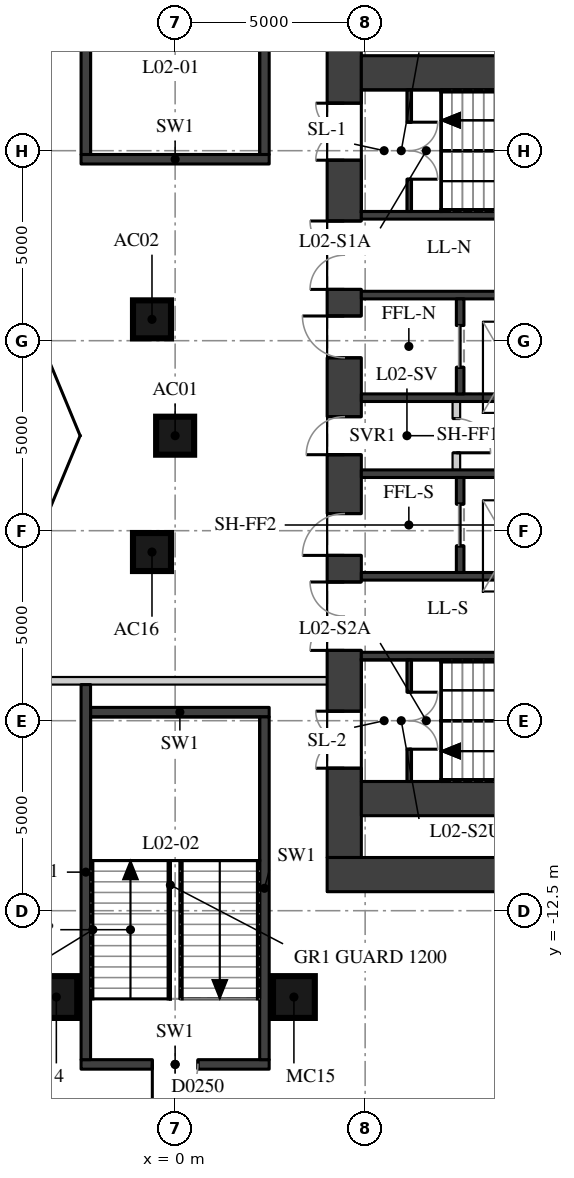
"""IFC4 building model, lengths in metres.
Left out: names, types, materials, properties, quantities, classifications, styles, units other than length and angle.
Written with IfcOpenShell. Run it as: python <this file> out.ifc"""

import sys

from ifc_helpers import new_model, si_unit, direction, frame, frame_2d, origin, origin_2d, place, context, subcontext, project, spatial, rectangle, extrude, element, fill, save


model = new_model("IFC4")
c1 = context("Model", 3, precision=1e-05, world=origin(), true_north=direction((0.0, 1.0)))
c2 = subcontext(c1, "Body", "Model", "MODEL_VIEW")
j1 = project(units=[si_unit("LENGTHUNIT", "METRE"), si_unit("PLANEANGLEUNIT", "RADIAN")], contexts=[c1])
p1 = place(None, origin())
s1 = spatial("IfcSite", under=j1, at=p1, CompositionType="ELEMENT")
p2 = place(p1, origin())
s2 = spatial("IfcBuilding", under=s1, at=p2, CompositionType="ELEMENT")
p3 = place(p2, frame((0.0, 0.0, 12.5)))
s3 = spatial("IfcBuildingStorey", under=s2, at=p3, CompositionType="ELEMENT", Elevation=12.5)
for number, where, z_axis, x_axis in (
    (1, (0.0, 0.0, 0.0), (0.0, 0.0, 1.0), (1.0, 0.0, 0.0)),
    (2, (-0.609, 3.062, 0.0), (0.0, 0.0, 1.0), (1.0, 0.0, 0.0)),
    (3, (-0.609, -3.062, 0.0), (0.0, 0.0, 1.0), (1.0, 0.0, 0.0)),
):
    element("IfcColumn", number, at=place(p3, frame(where, z_axis=z_axis, x_axis=x_axis)), inside=s3, PredefinedType="COLUMN", context=c2, shape_type="SweptSolid", body=[
        extrude(rectangle(XDim=1.0, YDim=1.0, at=origin_2d()), origin(), (0.0, 0.0, 1.0), 5.0),
    ])
for number, where, z_axis, x_axis in (
    (4, (-3.126, -14.772, 0.0), (0.0, 0.0, 1.0), (1.0, 0.0, 0.0)),
    (5, (3.126, -14.772, 0.0), (0.0, 0.0, 1.0), (1.0, 0.0, 0.0)),
):
    element("IfcColumn", number, at=place(p3, frame(where, z_axis=z_axis, x_axis=x_axis)), inside=s3, PredefinedType="COLUMN", context=c2, shape_type="SweptSolid", body=[
        extrude(rectangle(XDim=1.1, YDim=1.1, at=origin_2d()), origin(), (0.0, 0.0, 1.0), 5.0),
    ])
p4 = place(p3, frame((4.45, -11.1, 0.0), z_axis=(0.0, 0.0, 1.0), x_axis=(0.0, 1.0, 0.0)))
e6 = element("IfcWall", 6, at=p4, inside=s3, PredefinedType="SHEAR", context=c2, shape_type="SweptSolid", body=[
    extrude(rectangle(XDim=22.2, YDim=0.9, at=frame_2d((11.1, 0.0))), origin(), (0.0, 0.0, 1.0), 4.65),
])
p5 = place(p4, frame((2.35, 0.0, 0.0)))
e7 = element("IfcOpeningElement", 7, at=p5, cuts=e6, PredefinedType="OPENING", context=c2, shape_type="SweptSolid", body=[
    extrude(rectangle(XDim=1.5, YDim=2.1, at=frame_2d((0.75, 1.05))), frame((0.0, 0.46, 0.0), z_axis=(0.0, -1.0, 0.0), x_axis=(1.0, 0.0, 0.0)), (0.0, 0.0, 1.0), 0.92),
])
p6 = place(p4, frame((5.45, 0.0, 0.0)))
e8 = element("IfcOpeningElement", 8, at=p6, cuts=e6, PredefinedType="OPENING", context=c2, shape_type="SweptSolid", body=[
    extrude(rectangle(XDim=1.8, YDim=2.1, at=frame_2d((0.9, 1.05))), frame((0.0, 0.46, 0.0), z_axis=(0.0, -1.0, 0.0), x_axis=(1.0, 0.0, 0.0)), (0.0, 0.0, 1.0), 0.92),
])
p7 = place(p4, frame((7.95, 0.0, 0.0)))
e9 = element("IfcOpeningElement", 9, at=p7, cuts=e6, PredefinedType="OPENING", context=c2, shape_type="SweptSolid", body=[
    extrude(rectangle(XDim=1.1, YDim=2.1, at=frame_2d((0.55, 1.05))), frame((0.0, 0.46, 0.0), z_axis=(0.0, -1.0, 0.0), x_axis=(1.0, 0.0, 0.0)), (0.0, 0.0, 1.0), 0.92),
])
p8 = place(p4, frame((10.6, 0.0, 0.0)))
e10 = element("IfcOpeningElement", 10, at=p8, cuts=e6, PredefinedType="OPENING", context=c2, shape_type="SweptSolid", body=[
    extrude(rectangle(XDim=1.0, YDim=2.1, at=frame_2d((0.5, 1.05))), frame((0.0, 0.46, 0.0), z_axis=(0.0, -1.0, 0.0), x_axis=(1.0, 0.0, 0.0)), (0.0, 0.0, 1.0), 0.92),
])
p9 = place(p4, frame((13.15, 0.0, 0.0)))
e11 = element("IfcOpeningElement", 11, at=p9, cuts=e6, PredefinedType="OPENING", context=c2, shape_type="SweptSolid", body=[
    extrude(rectangle(XDim=1.1, YDim=2.1, at=frame_2d((0.55, 1.05))), frame((0.0, 0.46, 0.0), z_axis=(0.0, -1.0, 0.0), x_axis=(1.0, 0.0, 0.0)), (0.0, 0.0, 1.0), 0.92),
])
p10 = place(p4, frame((14.95, 0.0, 0.0)))
e12 = element("IfcOpeningElement", 12, at=p10, cuts=e6, PredefinedType="OPENING", context=c2, shape_type="SweptSolid", body=[
    extrude(rectangle(XDim=1.8, YDim=2.1, at=frame_2d((0.9, 1.05))), frame((0.0, 0.46, 0.0), z_axis=(0.0, -1.0, 0.0), x_axis=(1.0, 0.0, 0.0)), (0.0, 0.0, 1.0), 0.92),
])
p11 = place(p4, frame((18.35, 0.0, 0.0)))
e13 = element("IfcOpeningElement", 13, at=p11, cuts=e6, PredefinedType="OPENING", context=c2, shape_type="SweptSolid", body=[
    extrude(rectangle(XDim=1.5, YDim=2.1, at=frame_2d((0.75, 1.05))), frame((0.0, 0.46, 0.0), z_axis=(0.0, -1.0, 0.0), x_axis=(1.0, 0.0, 0.0)), (0.0, 0.0, 1.0), 0.92),
])
p12 = place(p3, frame((4.0, -11.55, 0.0), z_axis=(0.0, 0.0, 1.0), x_axis=(1.0, 0.0, 0.0)))
e14 = element("IfcWall", 14, at=p12, inside=s3, PredefinedType="SHEAR", context=c2, shape_type="SweptSolid", body=[
    extrude(rectangle(XDim=15.2, YDim=0.9, at=frame_2d((7.6, 0.0))), origin(), (0.0, 0.0, 1.0), 4.65),
])
for number, where, z_axis, x_axis in (
    (15, (4.9, 9.55, 0.0), (0.0, 0.0, 1.0), (1.0, 0.0, 0.0)),
    (16, (4.9, -9.55, 0.0), (0.0, 0.0, 1.0), (1.0, 0.0, 0.0)),
):
    element("IfcWall", number, at=place(p3, frame(where, z_axis=z_axis, x_axis=x_axis)), inside=s3, PredefinedType="SHEAR", context=c2, shape_type="SweptSolid", body=[
        extrude(rectangle(XDim=10.2, YDim=0.9, at=frame_2d((5.1, 0.0))), origin(), (0.0, 0.0, 1.0), 4.65),
    ])
p13 = place(p3, frame((4.9, 5.8, 0.0), z_axis=(0.0, 0.0, 1.0), x_axis=(1.0, 0.0, 0.0)))
e17 = element("IfcWall", 17, at=p13, inside=s3, PredefinedType="SHEAR", context=c2, shape_type="SweptSolid", body=[
    extrude(rectangle(XDim=10.2, YDim=0.2, at=frame_2d((5.1, 0.0))), origin(), (0.0, 0.0, 1.0), 4.65),
])
p14 = place(p13, frame((6.75, 0.0, 0.0)))
e18 = element("IfcOpeningElement", 18, at=p14, cuts=e17, PredefinedType="OPENING", context=c2, shape_type="SweptSolid", body=[
    extrude(rectangle(XDim=1.1, YDim=2.1, at=frame_2d((0.55, 1.05))), frame((0.0, 0.11, 0.0), z_axis=(0.0, -1.0, 0.0), x_axis=(1.0, 0.0, 0.0)), (0.0, 0.0, 1.0), 0.22),
])
p15 = place(p13, frame((8.75, 0.0, 0.0)))
e19 = element("IfcOpeningElement", 19, at=p15, cuts=e17, PredefinedType="OPENING", context=c2, shape_type="SweptSolid", body=[
    extrude(rectangle(XDim=1.1, YDim=2.1, at=frame_2d((0.55, 1.05))), frame((0.0, 0.11, 0.0), z_axis=(0.0, -1.0, 0.0), x_axis=(1.0, 0.0, 0.0)), (0.0, 0.0, 1.0), 0.22),
])
p16 = place(p3, frame((4.9, 3.7, 0.0), z_axis=(0.0, 0.0, 1.0), x_axis=(1.0, 0.0, 0.0)))
e20 = element("IfcWall", 20, at=p16, inside=s3, PredefinedType="SHEAR", context=c2, shape_type="SweptSolid", body=[
    extrude(rectangle(XDim=10.2, YDim=0.2, at=frame_2d((5.1, 0.0))), origin(), (0.0, 0.0, 1.0), 4.65),
])
p17 = place(p16, frame((6.3, 0.0, 0.0)))
e21 = element("IfcOpeningElement", 21, at=p17, cuts=e20, PredefinedType="OPENING", context=c2, shape_type="SweptSolid", body=[
    extrude(rectangle(XDim=1.1, YDim=2.1, at=frame_2d((0.55, 1.05))), frame((0.0, 0.11, 0.0), z_axis=(0.0, -1.0, 0.0), x_axis=(1.0, 0.0, 0.0)), (0.0, 0.0, 1.0), 0.22),
])
p18 = place(p16, frame((8.6, 0.0, 0.0)))
e22 = element("IfcOpeningElement", 22, at=p18, cuts=e20, PredefinedType="OPENING", context=c2, shape_type="SweptSolid", body=[
    extrude(rectangle(XDim=1.1, YDim=2.1, at=frame_2d((0.55, 1.05))), frame((0.0, 0.11, 0.0), z_axis=(0.0, -1.0, 0.0), x_axis=(1.0, 0.0, 0.0)), (0.0, 0.0, 1.0), 0.22),
])
for number, where, z_axis, x_axis in (
    (23, (4.9, 1.0, 0.0), (0.0, 0.0, 1.0), (1.0, 0.0, 0.0)),
    (24, (4.9, -1.0, 0.0), (0.0, 0.0, 1.0), (1.0, 0.0, 0.0)),
):
    element("IfcWall", number, at=place(p3, frame(where, z_axis=z_axis, x_axis=x_axis)), inside=s3, PredefinedType="SHEAR", context=c2, shape_type="SweptSolid", body=[
        extrude(rectangle(XDim=10.2, YDim=0.2, at=frame_2d((5.1, 0.0))), origin(), (0.0, 0.0, 1.0), 4.65),
    ])
p19 = place(p3, frame((4.9, -3.7, 0.0), z_axis=(0.0, 0.0, 1.0), x_axis=(1.0, 0.0, 0.0)))
e25 = element("IfcWall", 25, at=p19, inside=s3, PredefinedType="SHEAR", context=c2, shape_type="SweptSolid", body=[
    extrude(rectangle(XDim=10.2, YDim=0.2, at=frame_2d((5.1, 0.0))), origin(), (0.0, 0.0, 1.0), 4.65),
])
p20 = place(p19, frame((6.3, 0.0, 0.0)))
e26 = element("IfcOpeningElement", 26, at=p20, cuts=e25, PredefinedType="OPENING", context=c2, shape_type="SweptSolid", body=[
    extrude(rectangle(XDim=1.1, YDim=2.1, at=frame_2d((0.55, 1.05))), frame((0.0, 0.11, 0.0), z_axis=(0.0, -1.0, 0.0), x_axis=(1.0, 0.0, 0.0)), (0.0, 0.0, 1.0), 0.22),
])
p21 = place(p19, frame((8.6, 0.0, 0.0)))
e27 = element("IfcOpeningElement", 27, at=p21, cuts=e25, PredefinedType="OPENING", context=c2, shape_type="SweptSolid", body=[
    extrude(rectangle(XDim=1.1, YDim=2.1, at=frame_2d((0.55, 1.05))), frame((0.0, 0.11, 0.0), z_axis=(0.0, -1.0, 0.0), x_axis=(1.0, 0.0, 0.0)), (0.0, 0.0, 1.0), 0.22),
])
p22 = place(p3, frame((4.9, -5.8, 0.0), z_axis=(0.0, 0.0, 1.0), x_axis=(1.0, 0.0, 0.0)))
e28 = element("IfcWall", 28, at=p22, inside=s3, PredefinedType="SHEAR", context=c2, shape_type="SweptSolid", body=[
    extrude(rectangle(XDim=10.2, YDim=0.2, at=frame_2d((5.1, 0.0))), origin(), (0.0, 0.0, 1.0), 4.65),
])
p23 = place(p3, frame((7.5, 1.1, 0.0), z_axis=(0.0, 0.0, 1.0), x_axis=(0.0, 1.0, 0.0)))
e29 = element("IfcWall", 29, at=p23, inside=s3, PredefinedType="SHEAR", context=c2, shape_type="SweptSolid", body=[
    extrude(rectangle(XDim=2.5, YDim=0.2, at=frame_2d((1.25, 0.0))), origin(), (0.0, 0.0, 1.0), 4.65),
])
p24 = place(p23, frame((0.7, 0.0, 0.0)))
e30 = element("IfcOpeningElement", 30, at=p24, cuts=e29, PredefinedType="OPENING", context=c2, shape_type="SweptSolid", body=[
    extrude(rectangle(XDim=1.1, YDim=2.1, at=frame_2d((0.55, 1.05))), frame((0.0, 0.11, 0.0), z_axis=(0.0, -1.0, 0.0), x_axis=(1.0, 0.0, 0.0)), (0.0, 0.0, 1.0), 0.22),
])
p25 = place(p3, frame((7.5, -3.6, 0.0), z_axis=(0.0, 0.0, 1.0), x_axis=(0.0, 1.0, 0.0)))
e31 = element("IfcWall", 31, at=p25, inside=s3, PredefinedType="SHEAR", context=c2, shape_type="SweptSolid", body=[
    extrude(rectangle(XDim=2.5, YDim=0.2, at=frame_2d((1.25, 0.0))), origin(), (0.0, 0.0, 1.0), 4.65),
])
p26 = place(p25, frame((0.7, 0.0, 0.0)))
e32 = element("IfcOpeningElement", 32, at=p26, cuts=e31, PredefinedType="OPENING", context=c2, shape_type="SweptSolid", body=[
    extrude(rectangle(XDim=1.1, YDim=2.1, at=frame_2d((0.55, 1.05))), frame((0.0, 0.11, 0.0), z_axis=(0.0, -1.0, 0.0), x_axis=(1.0, 0.0, 0.0)), (0.0, 0.0, 1.0), 0.22),
])
p27 = place(p3, frame((6.16, 5.9, 0.0), z_axis=(0.0, 0.0, 1.0), x_axis=(0.0, 1.0, 0.0)))
e33 = element("IfcWall", 33, at=p27, inside=s3, PredefinedType="SHEAR", context=c2, shape_type="SweptSolid", body=[
    extrude(rectangle(XDim=3.2, YDim=0.12, at=frame_2d((1.6, 0.0))), origin(), (0.0, 0.0, 1.0), 2.29),
])
p28 = place(p27, frame((0.85, 0.0, 0.0)))
e34 = element("IfcOpeningElement", 34, at=p28, cuts=e33, PredefinedType="OPENING", context=c2, shape_type="SweptSolid", body=[
    extrude(rectangle(XDim=1.5, YDim=2.1, at=frame_2d((0.75, 1.05))), frame((0.0, 0.07, 0.0), z_axis=(0.0, -1.0, 0.0), x_axis=(1.0, 0.0, 0.0)), (0.0, 0.0, 1.0), 0.14),
])
p29 = place(p3, frame((6.16, -9.1, 0.0), z_axis=(0.0, 0.0, 1.0), x_axis=(0.0, 1.0, 0.0)))
e35 = element("IfcWall", 35, at=p29, inside=s3, PredefinedType="SHEAR", context=c2, shape_type="SweptSolid", body=[
    extrude(rectangle(XDim=3.2, YDim=0.12, at=frame_2d((1.6, 0.0))), origin(), (0.0, 0.0, 1.0), 2.29),
])
p30 = place(p29, frame((0.85, 0.0, 0.0)))
e36 = element("IfcOpeningElement", 36, at=p30, cuts=e35, PredefinedType="OPENING", context=c2, shape_type="SweptSolid", body=[
    extrude(rectangle(XDim=1.5, YDim=2.1, at=frame_2d((0.75, 1.05))), frame((0.0, 0.07, 0.0), z_axis=(0.0, -1.0, 0.0), x_axis=(1.0, 0.0, 0.0)), (0.0, 0.0, 1.0), 0.14),
])
p31 = place(p3, frame((7.4, -0.9, 0.0), z_axis=(0.0, 0.0, 1.0), x_axis=(0.0, 1.0, 0.0)))
e37 = element("IfcWall", 37, at=p31, inside=s3, PredefinedType="PARTITIONING", context=c2, shape_type="SweptSolid", body=[
    extrude(rectangle(XDim=1.8, YDim=0.2, at=frame_2d((0.9, 0.0))), origin(), (0.0, 0.0, 1.0), 4.65),
])
p32 = place(p31, frame((0.45, 0.0, 0.0)))
e38 = element("IfcOpeningElement", 38, at=p32, cuts=e37, PredefinedType="OPENING", context=c2, shape_type="SweptSolid", body=[
    extrude(rectangle(XDim=0.9, YDim=2.1, at=frame_2d((0.45, 1.05))), frame((0.0, 0.11, 0.0), z_axis=(0.0, -1.0, 0.0), x_axis=(1.0, 0.0, 0.0)), (0.0, 0.0, 1.0), 0.22),
])
p33 = place(p3, frame((-2.475, -16.545, 0.0), z_axis=(0.0, 0.0, 1.0), x_axis=(1.0, 0.0, 0.0)))
e39 = element("IfcWall", 39, at=p33, inside=s3, PredefinedType="SOLIDWALL", context=c2, shape_type="SweptSolid", body=[
    extrude(rectangle(XDim=4.95, YDim=0.25, at=frame_2d((2.475, 0.0))), origin(), (0.0, 0.0, 1.0), 4.65),
])
p34 = place(p33, frame((1.875, 0.0, 0.0)))
e40 = element("IfcOpeningElement", 40, at=p34, cuts=e39, PredefinedType="OPENING", context=c2, shape_type="SweptSolid", body=[
    extrude(rectangle(XDim=1.2, YDim=2.1, at=frame_2d((0.6, 1.05))), frame((0.0, 0.135, 0.0), z_axis=(0.0, -1.0, 0.0), x_axis=(1.0, 0.0, 0.0)), (0.0, 0.0, 1.0), 0.27),
])
p35 = place(p3, frame((-2.225, -7.275, 0.0), z_axis=(0.0, 0.0, 1.0), x_axis=(1.0, 0.0, 0.0)))
e41 = element("IfcWall", 41, at=p35, inside=s3, PredefinedType="SOLIDWALL", context=c2, shape_type="SweptSolid", body=[
    extrude(rectangle(XDim=4.7, YDim=0.25, at=frame_2d((2.35, 0.0))), origin(), (0.0, 0.0, 1.0), 4.65),
])
p36 = place(p3, frame((-14.4, -6.45, 0.0), z_axis=(0.0, 0.0, 1.0), x_axis=(1.0, 0.0, 0.0)))
e42 = element("IfcWall", 42, at=p36, inside=s3, PredefinedType="PARTITIONING", context=c2, shape_type="SweptSolid", body=[
    extrude(rectangle(XDim=18.402, YDim=0.2, at=frame_2d((9.201, 0.0))), origin(), (0.0, 0.0, 1.0), 4.65),
])
p37 = place(p36, frame((8.001, 0.0, 0.0)))
e43 = element("IfcOpeningElement", 43, at=p37, cuts=e42, PredefinedType="OPENING", context=c2, shape_type="SweptSolid", body=[
    extrude(rectangle(XDim=2.4, YDim=2.4, at=frame_2d((1.2, 1.2))), frame((0.0, 0.11, 0.0), z_axis=(0.0, -1.0, 0.0), x_axis=(1.0, 0.0, 0.0)), (0.0, 0.0, 1.0), 0.22),
])
p38 = place(p3, frame((-2.475, 7.275, 0.0), z_axis=(0.0, 0.0, 1.0), x_axis=(1.0, 0.0, 0.0)))
e44 = element("IfcWall", 44, at=p38, inside=s3, PredefinedType="SOLIDWALL", context=c2, shape_type="SweptSolid", body=[
    extrude(rectangle(XDim=4.95, YDim=0.25, at=frame_2d((2.475, 0.0))), origin(), (0.0, 0.0, 1.0), 4.65),
])
p39 = place(p3, frame((-2.35, -16.42, 0.0), z_axis=(0.0, 0.0, 1.0), x_axis=(0.0, 1.0, 0.0)))
e45 = element("IfcWall", 45, at=p39, inside=s3, PredefinedType="SOLIDWALL", context=c2, shape_type="SweptSolid", body=[
    extrude(rectangle(XDim=9.87, YDim=0.25, at=frame_2d((4.935, 0.0))), origin(), (0.0, 0.0, 1.0), 4.65),
])
p40 = place(p3, frame((-2.35, 7.4, 0.0), z_axis=(0.0, 0.0, 1.0), x_axis=(0.0, 1.0, 0.0)))
e46 = element("IfcWall", 46, at=p40, inside=s3, PredefinedType="SOLIDWALL", context=c2, shape_type="SweptSolid", body=[
    extrude(rectangle(XDim=9.27, YDim=0.25, at=frame_2d((4.635, 0.0))), origin(), (0.0, 0.0, 1.0), 4.65),
])
for number, where, z_axis, x_axis in (
    (47, (2.35, -16.42, 0.0), (0.0, 0.0, 1.0), (0.0, 1.0, 0.0)),
    (48, (2.35, 7.4, 0.0), (0.0, 0.0, 1.0), (0.0, 1.0, 0.0)),
):
    element("IfcWall", number, at=place(p3, frame(where, z_axis=z_axis, x_axis=x_axis)), inside=s3, PredefinedType="SOLIDWALL", context=c2, shape_type="SweptSolid", body=[
        extrude(rectangle(XDim=9.02, YDim=0.25, at=frame_2d((4.51, 0.0))), origin(), (0.0, 0.0, 1.0), 4.65),
    ])
p41 = place(p5, origin())
e49 = element("IfcDoor", 49, at=p41, inside=s3, OperationType="DOUBLE_DOOR_SINGLE_SWING", PredefinedType="DOOR", context=c2, shape_type="SweptSolid", body=[
    extrude(rectangle(XDim=1.5, YDim=2.1, at=frame_2d((0.75, 1.05))), frame((0.0, 0.025, 0.0), z_axis=(0.0, -1.0, 0.0), x_axis=(1.0, 0.0, 0.0)), (0.0, 0.0, 1.0), 0.05),
])
fill(e7, e49)
p42 = place(p6, origin())
e50 = element("IfcDoor", 50, at=p42, inside=s3, OperationType="DOUBLE_DOOR_SINGLE_SWING", PredefinedType="DOOR", context=c2, shape_type="SweptSolid", body=[
    extrude(rectangle(XDim=1.8, YDim=2.1, at=frame_2d((0.9, 1.05))), frame((0.0, 0.025, 0.0), z_axis=(0.0, -1.0, 0.0), x_axis=(1.0, 0.0, 0.0)), (0.0, 0.0, 1.0), 0.05),
])
fill(e8, e50)
p43 = place(p7, origin())
e51 = element("IfcDoor", 51, at=p43, inside=s3, OperationType="SINGLE_SWING_LEFT", PredefinedType="DOOR", context=c2, shape_type="SweptSolid", body=[
    extrude(rectangle(XDim=1.1, YDim=2.1, at=frame_2d((0.55, 1.05))), frame((0.0, 0.025, 0.0), z_axis=(0.0, -1.0, 0.0), x_axis=(1.0, 0.0, 0.0)), (0.0, 0.0, 1.0), 0.05),
])
fill(e9, e51)
p44 = place(p8, origin())
e52 = element("IfcDoor", 52, at=p44, inside=s3, OperationType="SINGLE_SWING_LEFT", PredefinedType="DOOR", context=c2, shape_type="SweptSolid", body=[
    extrude(rectangle(XDim=1.0, YDim=2.1, at=frame_2d((0.5, 1.05))), frame((0.0, 0.025, 0.0), z_axis=(0.0, -1.0, 0.0), x_axis=(1.0, 0.0, 0.0)), (0.0, 0.0, 1.0), 0.05),
])
fill(e10, e52)
p45 = place(p9, origin())
e53 = element("IfcDoor", 53, at=p45, inside=s3, OperationType="SINGLE_SWING_RIGHT", PredefinedType="DOOR", context=c2, shape_type="SweptSolid", body=[
    extrude(rectangle(XDim=1.1, YDim=2.1, at=frame_2d((0.55, 1.05))), frame((0.0, 0.025, 0.0), z_axis=(0.0, -1.0, 0.0), x_axis=(1.0, 0.0, 0.0)), (0.0, 0.0, 1.0), 0.05),
])
fill(e11, e53)
p46 = place(p10, origin())
e54 = element("IfcDoor", 54, at=p46, inside=s3, OperationType="DOUBLE_DOOR_SINGLE_SWING", PredefinedType="DOOR", context=c2, shape_type="SweptSolid", body=[
    extrude(rectangle(XDim=1.8, YDim=2.1, at=frame_2d((0.9, 1.05))), frame((0.0, 0.025, 0.0), z_axis=(0.0, -1.0, 0.0), x_axis=(1.0, 0.0, 0.0)), (0.0, 0.0, 1.0), 0.05),
])
fill(e12, e54)
p47 = place(p11, origin())
e55 = element("IfcDoor", 55, at=p47, inside=s3, OperationType="DOUBLE_DOOR_SINGLE_SWING", PredefinedType="DOOR", context=c2, shape_type="SweptSolid", body=[
    extrude(rectangle(XDim=1.5, YDim=2.1, at=frame_2d((0.75, 1.05))), frame((0.0, 0.025, 0.0), z_axis=(0.0, -1.0, 0.0), x_axis=(1.0, 0.0, 0.0)), (0.0, 0.0, 1.0), 0.05),
])
fill(e13, e55)
p48 = place(p28, origin())
e56 = element("IfcDoor", 56, at=p48, inside=s3, OperationType="DOUBLE_DOOR_SINGLE_SWING", PredefinedType="DOOR", context=c2, shape_type="SweptSolid", body=[
    extrude(rectangle(XDim=1.5, YDim=2.1, at=frame_2d((0.75, 1.05))), frame((0.0, 0.025, 0.0), z_axis=(0.0, -1.0, 0.0), x_axis=(1.0, 0.0, 0.0)), (0.0, 0.0, 1.0), 0.05),
])
fill(e34, e56)
p49 = place(p30, origin())
e57 = element("IfcDoor", 57, at=p49, inside=s3, OperationType="DOUBLE_DOOR_SINGLE_SWING", PredefinedType="DOOR", context=c2, shape_type="SweptSolid", body=[
    extrude(rectangle(XDim=1.5, YDim=2.1, at=frame_2d((0.75, 1.05))), frame((0.0, 0.025, 0.0), z_axis=(0.0, -1.0, 0.0), x_axis=(1.0, 0.0, 0.0)), (0.0, 0.0, 1.0), 0.05),
])
fill(e36, e57)
p50 = place(p24, origin())
e58 = element("IfcDoor", 58, at=p50, inside=s3, OperationType="DOUBLE_DOOR_SLIDING", PredefinedType="DOOR", context=c2, shape_type="SweptSolid", body=[
    extrude(rectangle(XDim=1.1, YDim=2.1, at=frame_2d((0.55, 1.05))), frame((0.0, 0.025, 0.0), z_axis=(0.0, -1.0, 0.0), x_axis=(1.0, 0.0, 0.0)), (0.0, 0.0, 1.0), 0.05),
])
fill(e30, e58)
p51 = place(p26, origin())
e59 = element("IfcDoor", 59, at=p51, inside=s3, OperationType="DOUBLE_DOOR_SLIDING", PredefinedType="DOOR", context=c2, shape_type="SweptSolid", body=[
    extrude(rectangle(XDim=1.1, YDim=2.1, at=frame_2d((0.55, 1.05))), frame((0.0, 0.025, 0.0), z_axis=(0.0, -1.0, 0.0), x_axis=(1.0, 0.0, 0.0)), (0.0, 0.0, 1.0), 0.05),
])
fill(e32, e59)
p52 = place(p32, origin())
e60 = element("IfcDoor", 60, at=p52, inside=s3, OperationType="SINGLE_SWING_RIGHT", PredefinedType="DOOR", context=c2, shape_type="SweptSolid", body=[
    extrude(rectangle(XDim=0.9, YDim=2.1, at=frame_2d((0.45, 1.05))), frame((0.0, 0.025, 0.0), z_axis=(0.0, -1.0, 0.0), x_axis=(1.0, 0.0, 0.0)), (0.0, 0.0, 1.0), 0.05),
])
fill(e38, e60)
p53 = place(p34, origin())
e61 = element("IfcDoor", 61, at=p53, inside=s3, OperationType="SINGLE_SWING_RIGHT", PredefinedType="DOOR", context=c2, shape_type="SweptSolid", body=[
    extrude(rectangle(XDim=1.2, YDim=2.1, at=frame_2d((0.6, 1.05))), frame((0.0, 0.025, 0.0), z_axis=(0.0, -1.0, 0.0), x_axis=(1.0, 0.0, 0.0)), (0.0, 0.0, 1.0), 0.05),
])
fill(e40, e61)
save(model, sys.argv[1])
